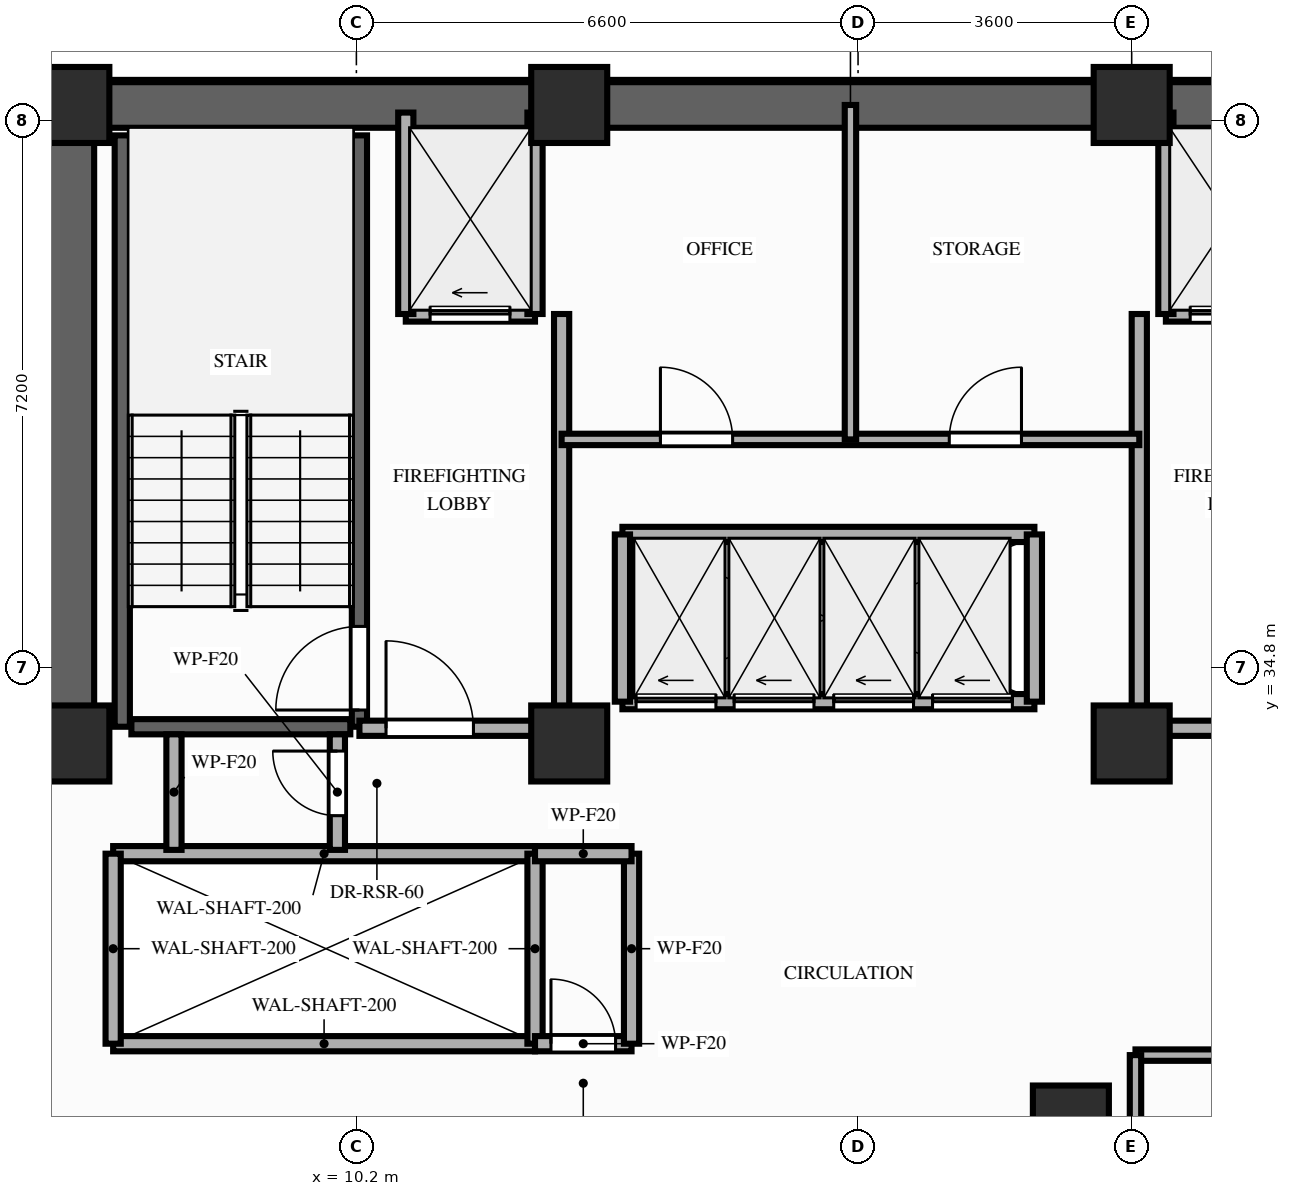
"""IFC4 building model, lengths in metres.
Left out: names, types, materials, properties, quantities, classifications, styles, units other than length and angle.
Written with IfcOpenShell. Run it as: python <this file> out.ifc"""

import sys

from ifc_helpers import new_model, si_unit, direction, frame, frame_2d, origin, origin_2d, place, context, subcontext, project, spatial, rectangle, extrude, element, fill, save


model = new_model("IFC4")
c1 = context("Model", 3, precision=1e-05, world=origin(), true_north=direction((0.0, 1.0)))
c2 = subcontext(c1, "Body", "Model", "MODEL_VIEW")
j1 = project(units=[si_unit("LENGTHUNIT", "METRE"), si_unit("PLANEANGLEUNIT", "RADIAN")], contexts=[c1])
p1 = place(None, origin())
s1 = spatial("IfcSite", under=j1, at=p1, CompositionType="ELEMENT")
p2 = place(p1, origin())
s2 = spatial("IfcBuilding", under=s1, at=p2, CompositionType="ELEMENT")
p3 = place(p2, frame((0.0, 0.0, 110.6)))
s3 = spatial("IfcBuildingStorey", under=s2, at=p3, CompositionType="ELEMENT", Elevation=110.6)
for number, where, z_axis, x_axis in (
    (1, (6.45, 33.8, 0.0), (0.0, 0.0, 1.0), (1.0, 0.0, 0.0)),
    (2, (13.0, 33.8, 0.0), (0.0, 0.0, 1.0), (1.0, 0.0, 0.0)),
    (3, (20.4, 33.8, 0.0), (0.0, 0.0, 1.0), (1.0, 0.0, 0.0)),
    (4, (6.45, 42.2, 0.0), (0.0, 0.0, 1.0), (1.0, 0.0, 0.0)),
    (5, (13.0, 42.2, 0.0), (0.0, 0.0, 1.0), (1.0, 0.0, 0.0)),
    (6, (20.4, 42.2, 0.0), (0.0, 0.0, 1.0), (1.0, 0.0, 0.0)),
    (7, (19.6, 28.8, 0.0), (0.0, 0.0, 1.0), (1.0, 0.0, 0.0)),
):
    element("IfcColumn", number, at=place(p3, frame(where, z_axis=z_axis, x_axis=x_axis)), inside=s3, PredefinedType="COLUMN", context=c2, shape_type="SweptSolid", body=[
        extrude(rectangle(XDim=1.0, YDim=1.0, at=origin_2d()), origin(), (0.0, 0.0, 1.0), 3.2),
    ])
p4 = place(p3, frame((6.45, 42.2, 0.0), z_axis=(0.0, 0.0, 1.0), x_axis=(1.0, 0.0, 0.0)))
e8 = element("IfcWall", 8, at=p4, inside=s3, PredefinedType="SHEAR", context=c2, shape_type="SweptSolid", body=[
    extrude(rectangle(XDim=20.45, YDim=0.6, at=frame_2d((10.225, 0.0))), origin(), (0.0, 0.0, 1.0), 3.02),
])
p5 = place(p3, frame((6.45, 33.8, 0.0), z_axis=(0.0, 0.0, 1.0), x_axis=(0.0, 1.0, 0.0)))
e9 = element("IfcWall", 9, at=p5, inside=s3, PredefinedType="SHEAR", context=c2, shape_type="SweptSolid", body=[
    extrude(rectangle(XDim=7.95, YDim=0.6, at=frame_2d((3.975, 0.0))), origin(), (0.0, 0.0, 1.0), 3.02),
])
p6 = place(p3, frame((7.12, 34.02, 0.0), z_axis=(0.0, 0.0, 1.0), x_axis=(0.0, 1.0, 0.0)))
e10 = element("IfcWall", 10, at=p6, inside=s3, PredefinedType="SHEAR", context=c2, shape_type="SweptSolid", body=[
    extrude(rectangle(XDim=7.78, YDim=0.2, at=frame_2d((3.89, 0.0))), origin(), (0.0, 0.0, 1.0), 3.02),
])
p7 = place(p3, frame((10.24, 34.02, 0.0), z_axis=(0.0, 0.0, 1.0), x_axis=(0.0, 1.0, 0.0)))
e11 = element("IfcWall", 11, at=p7, inside=s3, PredefinedType="SHEAR", context=c2, shape_type="SweptSolid", body=[
    extrude(rectangle(XDim=7.78, YDim=0.2, at=frame_2d((3.89, 0.0))), origin(), (0.0, 0.0, 1.0), 3.02),
])
p8 = place(p7, frame((0.22, 0.0, 0.0)))
e12 = element("IfcOpeningElement", 12, at=p8, cuts=e11, PredefinedType="OPENING", context=c2, shape_type="SweptSolid", body=[
    extrude(rectangle(XDim=1.1, YDim=2.15, at=frame_2d((0.55, 1.075))), frame((0.0, 0.11, 0.0), z_axis=(0.0, -1.0, 0.0), x_axis=(1.0, 0.0, 0.0)), (0.0, 0.0, 1.0), 0.22),
])
p9 = place(p3, frame((7.24, 34.02, 0.0), z_axis=(0.0, 0.0, 1.0), x_axis=(1.0, 0.0, 0.0)))
e13 = element("IfcWall", 13, at=p9, inside=s3, PredefinedType="SHEAR", context=c2, shape_type="SweptSolid", body=[
    extrude(rectangle(XDim=2.88, YDim=0.2, at=frame_2d((1.44, 0.0))), origin(), (0.0, 0.0, 1.0), 3.02),
])
for number, where, z_axis, x_axis in (
    (14, (7.0, 29.85, 0.0), (0.0, 0.0, 1.0), (1.0, 0.0, 0.0)),
    (15, (7.0, 32.35, 0.0), (0.0, 0.0, 1.0), (1.0, 0.0, 0.0)),
):
    element("IfcWall", number, at=place(p3, frame(where, z_axis=z_axis, x_axis=x_axis)), inside=s3, PredefinedType="MOVABLE", context=c2, shape_type="SweptSolid", body=[
        extrude(rectangle(XDim=5.55, YDim=0.2, at=frame_2d((2.775, 0.0))), origin(), (0.0, 0.0, 1.0), 3.02),
    ])
for number, where, z_axis, x_axis in (
    (16, (7.0, 29.85, 0.0), (0.0, 0.0, 1.0), (0.0, 1.0, 0.0)),
    (17, (12.55, 29.85, 0.0), (0.0, 0.0, 1.0), (0.0, 1.0, 0.0)),
):
    element("IfcWall", number, at=place(p3, frame(where, z_axis=z_axis, x_axis=x_axis)), inside=s3, PredefinedType="MOVABLE", context=c2, shape_type="SweptSolid", body=[
        extrude(rectangle(XDim=2.5, YDim=0.2, at=frame_2d((1.25, 0.0))), origin(), (0.0, 0.0, 1.0), 3.02),
    ])
p10 = place(p3, frame((10.85, 39.45, 0.0), z_axis=(0.0, 0.0, 1.0), x_axis=(1.0, 0.0, 0.0)))
e18 = element("IfcWall", 18, at=p10, inside=s3, PredefinedType="MOVABLE", context=c2, shape_type="SweptSolid", body=[
    extrude(rectangle(XDim=1.7, YDim=0.2, at=frame_2d((0.85, 0.0))), origin(), (0.0, 0.0, 1.0), 3.02),
])
p11 = place(p10, frame((0.32, 0.0, 0.0)))
e19 = element("IfcOpeningElement", 19, at=p11, cuts=e18, PredefinedType="OPENING", context=c2, shape_type="SweptSolid", body=[
    extrude(rectangle(XDim=1.05, YDim=2.15, at=frame_2d((0.525, 1.075))), frame((0.0, 0.11, 0.0), z_axis=(0.0, -1.0, 0.0), x_axis=(1.0, 0.0, 0.0)), (0.0, 0.0, 1.0), 0.22),
])
p12 = place(p3, frame((20.85, 39.45, 0.0), z_axis=(0.0, 0.0, 1.0), x_axis=(1.0, 0.0, 0.0)))
e20 = element("IfcWall", 20, at=p12, inside=s3, PredefinedType="MOVABLE", context=c2, shape_type="SweptSolid", body=[
    extrude(rectangle(XDim=1.7, YDim=0.2, at=frame_2d((0.85, 0.0))), origin(), (0.0, 0.0, 1.0), 3.02),
])
p13 = place(p12, frame((0.32, 0.0, 0.0)))
e21 = element("IfcOpeningElement", 21, at=p13, cuts=e20, PredefinedType="OPENING", context=c2, shape_type="SweptSolid", body=[
    extrude(rectangle(XDim=1.05, YDim=2.15, at=frame_2d((0.525, 1.075))), frame((0.0, 0.11, 0.0), z_axis=(0.0, -1.0, 0.0), x_axis=(1.0, 0.0, 0.0)), (0.0, 0.0, 1.0), 0.22),
])
for number, where, z_axis, x_axis in (
    (22, (10.85, 39.45, 0.0), (0.0, 0.0, 1.0), (0.0, 1.0, 0.0)),
    (23, (12.55, 39.45, 0.0), (0.0, 0.0, 1.0), (0.0, 1.0, 0.0)),
):
    element("IfcWall", number, at=place(p3, frame(where, z_axis=z_axis, x_axis=x_axis)), inside=s3, PredefinedType="MOVABLE", context=c2, shape_type="SweptSolid", body=[
        extrude(rectangle(XDim=2.65, YDim=0.2, at=frame_2d((1.325, 0.0))), origin(), (0.0, 0.0, 1.0), 2.4),
    ])
p14 = place(p3, frame((12.9, 34.0, 0.0), z_axis=(0.0, 0.0, 1.0), x_axis=(0.0, 1.0, 0.0)))
e24 = element("IfcWall", 24, at=p14, inside=s3, PredefinedType="PARTITIONING", context=c2, shape_type="SweptSolid", body=[
    extrude(rectangle(XDim=5.45, YDim=0.2, at=frame_2d((2.725, 0.0))), origin(), (0.0, 0.0, 1.0), 2.4),
])
p15 = place(p3, frame((10.24, 34.0, 0.0), z_axis=(0.0, 0.0, 1.0), x_axis=(1.0, 0.0, 0.0)))
e25 = element("IfcWall", 25, at=p15, inside=s3, PredefinedType="PARTITIONING", context=c2, shape_type="SweptSolid", body=[
    extrude(rectangle(XDim=2.66, YDim=0.2, at=frame_2d((1.33, 0.0))), origin(), (0.0, 0.0, 1.0), 2.4),
])
p16 = place(p15, frame((0.35, 0.0, 0.0)))
e26 = element("IfcOpeningElement", 26, at=p16, cuts=e25, PredefinedType="OPENING", context=c2, shape_type="SweptSolid", body=[
    extrude(rectangle(XDim=1.15, YDim=2.15, at=frame_2d((0.575, 1.075))), frame((0.0, 0.11, 0.0), z_axis=(0.0, -1.0, 0.0), x_axis=(1.0, 0.0, 0.0)), (0.0, 0.0, 1.0), 0.22),
])
p17 = place(p3, frame((20.85, 39.45, 0.0), z_axis=(0.0, 0.0, 1.0), x_axis=(0.0, 1.0, 0.0)))
e27 = element("IfcWall", 27, at=p17, inside=s3, PredefinedType="MOVABLE", context=c2, shape_type="SweptSolid", body=[
    extrude(rectangle(XDim=2.65, YDim=0.2, at=frame_2d((1.325, 0.0))), origin(), (0.0, 0.0, 1.0), 2.4),
])
p18 = place(p3, frame((20.5, 34.0, 0.0), z_axis=(0.0, 0.0, 1.0), x_axis=(0.0, 1.0, 0.0)))
e28 = element("IfcWall", 28, at=p18, inside=s3, PredefinedType="PARTITIONING", context=c2, shape_type="SweptSolid", body=[
    extrude(rectangle(XDim=5.45, YDim=0.2, at=frame_2d((2.725, 0.0))), origin(), (0.0, 0.0, 1.0), 2.4),
])
p19 = place(p3, frame((20.5, 34.0, 0.0), z_axis=(0.0, 0.0, 1.0), x_axis=(1.0, 0.0, 0.0)))
e29 = element("IfcWall", 29, at=p19, inside=s3, PredefinedType="PARTITIONING", context=c2, shape_type="SweptSolid", body=[
    extrude(rectangle(XDim=2.6, YDim=0.2, at=frame_2d((1.3, 0.0))), origin(), (0.0, 0.0, 1.0), 2.4),
])
p20 = place(p19, frame((1.05, 0.0, 0.0)))
e30 = element("IfcOpeningElement", 30, at=p20, cuts=e29, PredefinedType="OPENING", context=c2, shape_type="SweptSolid", body=[
    extrude(rectangle(XDim=1.15, YDim=2.15, at=frame_2d((0.575, 1.075))), frame((0.0, 0.11, 0.0), z_axis=(0.0, -1.0, 0.0), x_axis=(1.0, 0.0, 0.0)), (0.0, 0.0, 1.0), 0.22),
])
p21 = place(p3, frame((12.55, 29.85, 0.0), z_axis=(0.0, 0.0, 1.0), x_axis=(1.0, 0.0, 0.0)))
e31 = element("IfcWall", 31, at=p21, inside=s3, PredefinedType="PARTITIONING", context=c2, shape_type="SweptSolid", body=[
    extrude(rectangle(XDim=1.27, YDim=0.2, at=frame_2d((0.635, 0.0))), origin(), (0.0, 0.0, 1.0), 3.02),
])
p22 = place(p21, frame((0.21, 0.0, 0.0)))
e32 = element("IfcOpeningElement", 32, at=p22, cuts=e31, PredefinedType="OPENING", context=c2, shape_type="SweptSolid", body=[
    extrude(rectangle(XDim=0.85, YDim=2.05, at=frame_2d((0.425, 1.025))), frame((0.0, 0.11, 0.0), z_axis=(0.0, -1.0, 0.0), x_axis=(1.0, 0.0, 0.0)), (0.0, 0.0, 1.0), 0.22),
])
p23 = place(p3, frame((13.82, 29.85, 0.0), z_axis=(0.0, 0.0, 1.0), x_axis=(0.0, 1.0, 0.0)))
e33 = element("IfcWall", 33, at=p23, inside=s3, PredefinedType="PARTITIONING", context=c2, shape_type="SweptSolid", body=[
    extrude(rectangle(XDim=2.5, YDim=0.2, at=frame_2d((1.25, 0.0))), origin(), (0.0, 0.0, 1.0), 3.02),
])
p24 = place(p3, frame((12.55, 32.35, 0.0), z_axis=(0.0, 0.0, 1.0), x_axis=(1.0, 0.0, 0.0)))
e34 = element("IfcWall", 34, at=p24, inside=s3, PredefinedType="PARTITIONING", context=c2, shape_type="SweptSolid", body=[
    extrude(rectangle(XDim=1.27, YDim=0.2, at=frame_2d((0.635, 0.0))), origin(), (0.0, 0.0, 1.0), 3.02),
])
p25 = place(p3, frame((7.8, 32.4, 0.0), z_axis=(0.0, 0.0, 1.0), x_axis=(0.0, 1.0, 0.0)))
e35 = element("IfcWall", 35, at=p25, inside=s3, PredefinedType="PARTITIONING", context=c2, shape_type="SweptSolid", body=[
    extrude(rectangle(XDim=1.52, YDim=0.2, at=frame_2d((0.76, 0.0))), origin(), (0.0, 0.0, 1.0), 2.4),
])
p26 = place(p3, frame((9.95, 32.4, 0.0), z_axis=(0.0, 0.0, 1.0), x_axis=(0.0, 1.0, 0.0)))
e36 = element("IfcWall", 36, at=p26, inside=s3, PredefinedType="PARTITIONING", context=c2, shape_type="SweptSolid", body=[
    extrude(rectangle(XDim=1.52, YDim=0.2, at=frame_2d((0.76, 0.0))), origin(), (0.0, 0.0, 1.0), 2.4),
])
p27 = place(p26, frame((0.45, 0.0, 0.0)))
e37 = element("IfcOpeningElement", 37, at=p27, cuts=e36, PredefinedType="OPENING", context=c2, shape_type="SweptSolid", body=[
    extrude(rectangle(XDim=0.85, YDim=2.05, at=frame_2d((0.425, 1.025))), frame((0.0, 0.11, 0.0), z_axis=(0.0, -1.0, 0.0), x_axis=(1.0, 0.0, 0.0)), (0.0, 0.0, 1.0), 0.22),
])
p28 = place(p3, frame((12.9, 37.8, 0.0), z_axis=(0.0, 0.0, 1.0), x_axis=(1.0, 0.0, 0.0)))
e38 = element("IfcWall", 38, at=p28, inside=s3, PredefinedType="PARTITIONING", context=c2, shape_type="SweptSolid", body=[
    extrude(rectangle(XDim=7.6, YDim=0.15, at=frame_2d((3.8, 0.0))), origin(), (0.0, 0.0, 1.0), 3.02),
])
p29 = place(p28, frame((1.3, 0.0, 0.0)))
e39 = element("IfcOpeningElement", 39, at=p29, cuts=e38, PredefinedType="OPENING", context=c2, shape_type="SweptSolid", body=[
    extrude(rectangle(XDim=0.95, YDim=2.15, at=frame_2d((0.475, 1.075))), frame((0.0, 0.085, 0.0), z_axis=(0.0, -1.0, 0.0), x_axis=(1.0, 0.0, 0.0)), (0.0, 0.0, 1.0), 0.17),
])
p30 = place(p28, frame((5.1, 0.0, 0.0)))
e40 = element("IfcOpeningElement", 40, at=p30, cuts=e38, PredefinedType="OPENING", context=c2, shape_type="SweptSolid", body=[
    extrude(rectangle(XDim=0.95, YDim=2.15, at=frame_2d((0.475, 1.075))), frame((0.0, 0.085, 0.0), z_axis=(0.0, -1.0, 0.0), x_axis=(1.0, 0.0, 0.0)), (0.0, 0.0, 1.0), 0.17),
])
p31 = place(p3, frame((16.7, 37.8, 0.0), z_axis=(0.0, 0.0, 1.0), x_axis=(0.0, 1.0, 0.0)))
e41 = element("IfcWall", 41, at=p31, inside=s3, PredefinedType="PARTITIONING", context=c2, shape_type="SweptSolid", body=[
    extrude(rectangle(XDim=4.4, YDim=0.15, at=frame_2d((2.2, 0.0))), origin(), (0.0, 0.0, 1.0), 2.4),
])
p32 = place(p3, frame((13.7, 34.35, 0.0), z_axis=(0.0, 0.0, 1.0), x_axis=(1.0, 0.0, 0.0)))
e42 = element("IfcWall", 42, at=p32, inside=s3, PredefinedType="MOVABLE", context=c2, shape_type="SweptSolid", body=[
    extrude(rectangle(XDim=5.42, YDim=0.2, at=frame_2d((2.71, 0.0))), origin(), (0.0, 0.0, 1.0), 3.02),
])
p33 = place(p32, frame((0.18, 0.0, 0.0)))
e43 = element("IfcOpeningElement", 43, at=p33, cuts=e42, PredefinedType="OPENING", context=c2, shape_type="SweptSolid", body=[
    extrude(rectangle(XDim=1.05, YDim=2.15, at=frame_2d((0.525, 1.075))), frame((0.0, 0.11, 0.0), z_axis=(0.0, -1.0, 0.0), x_axis=(1.0, 0.0, 0.0)), (0.0, 0.0, 1.0), 0.22),
])
p34 = place(p32, frame((1.47, 0.0, 0.0)))
e44 = element("IfcOpeningElement", 44, at=p34, cuts=e42, PredefinedType="OPENING", context=c2, shape_type="SweptSolid", body=[
    extrude(rectangle(XDim=1.05, YDim=2.15, at=frame_2d((0.525, 1.075))), frame((0.0, 0.11, 0.0), z_axis=(0.0, -1.0, 0.0), x_axis=(1.0, 0.0, 0.0)), (0.0, 0.0, 1.0), 0.22),
])
p35 = place(p32, frame((2.78, 0.0, 0.0)))
e45 = element("IfcOpeningElement", 45, at=p35, cuts=e42, PredefinedType="OPENING", context=c2, shape_type="SweptSolid", body=[
    extrude(rectangle(XDim=1.05, YDim=2.15, at=frame_2d((0.525, 1.075))), frame((0.0, 0.11, 0.0), z_axis=(0.0, -1.0, 0.0), x_axis=(1.0, 0.0, 0.0)), (0.0, 0.0, 1.0), 0.22),
])
p36 = place(p32, frame((4.08, 0.0, 0.0)))
e46 = element("IfcOpeningElement", 46, at=p36, cuts=e42, PredefinedType="OPENING", context=c2, shape_type="SweptSolid", body=[
    extrude(rectangle(XDim=1.05, YDim=2.15, at=frame_2d((0.525, 1.075))), frame((0.0, 0.11, 0.0), z_axis=(0.0, -1.0, 0.0), x_axis=(1.0, 0.0, 0.0)), (0.0, 0.0, 1.0), 0.22),
])
p37 = place(p3, frame((13.7, 36.55, 0.0), z_axis=(0.0, 0.0, 1.0), x_axis=(1.0, 0.0, 0.0)))
e47 = element("IfcWall", 47, at=p37, inside=s3, PredefinedType="MOVABLE", context=c2, shape_type="SweptSolid", body=[
    extrude(rectangle(XDim=5.42, YDim=0.2, at=frame_2d((2.71, 0.0))), origin(), (0.0, 0.0, 1.0), 3.02),
])
for number, where, z_axis, x_axis in (
    (48, (13.7, 34.35, 0.0), (0.0, 0.0, 1.0), (0.0, 1.0, 0.0)),
    (49, (19.12, 34.35, 0.0), (0.0, 0.0, 1.0), (0.0, 1.0, 0.0)),
):
    element("IfcWall", number, at=place(p3, frame(where, z_axis=z_axis, x_axis=x_axis)), inside=s3, PredefinedType="MOVABLE", context=c2, shape_type="SweptSolid", body=[
        extrude(rectangle(XDim=2.2, YDim=0.2, at=frame_2d((1.1, 0.0))), origin(), (0.0, 0.0, 1.0), 3.02),
    ])
p38 = place(p3, frame((20.45, 29.7, 0.0), z_axis=(0.0, 0.0, 1.0), x_axis=(1.0, 0.0, 0.0)))
e50 = element("IfcWall", 50, at=p38, inside=s3, PredefinedType="PARTITIONING", context=c2, shape_type="SweptSolid", body=[
    extrude(rectangle(XDim=6.7, YDim=0.15, at=frame_2d((3.35, 0.0))), origin(), (0.0, 0.0, 1.0), 3.02),
])
p39 = place(p38, frame((2.8, 0.0, 0.0)))
e51 = element("IfcOpeningElement", 51, at=p39, cuts=e50, PredefinedType="OPENING", context=c2, shape_type="SweptSolid", body=[
    extrude(rectangle(XDim=0.95, YDim=2.15, at=frame_2d((0.475, 1.075))), frame((0.0, 0.085, 0.0), z_axis=(0.0, -1.0, 0.0), x_axis=(1.0, 0.0, 0.0)), (0.0, 0.0, 1.0), 0.17),
])
p40 = place(p3, frame((20.45, 26.75, 0.0), z_axis=(0.0, 0.0, 1.0), x_axis=(0.0, 1.0, 0.0)))
e52 = element("IfcWall", 52, at=p40, inside=s3, PredefinedType="PARTITIONING", context=c2, shape_type="SweptSolid", body=[
    extrude(rectangle(XDim=2.95, YDim=0.15, at=frame_2d((1.475, 0.0))), origin(), (0.0, 0.0, 1.0), 2.4),
])
p41 = place(p8, origin())
e53 = element("IfcDoor", 53, at=p41, inside=s3, OperationType="SINGLE_SWING_LEFT", PredefinedType="DOOR", context=c2, shape_type="SweptSolid", body=[
    extrude(rectangle(XDim=1.1, YDim=2.15, at=frame_2d((0.55, 1.075))), frame((0.0, 0.025, 0.0), z_axis=(0.0, -1.0, 0.0), x_axis=(1.0, 0.0, 0.0)), (0.0, 0.0, 1.0), 0.05),
])
fill(e12, e53)
p42 = place(p11, origin())
e54 = element("IfcDoor", 54, at=p42, inside=s3, OperationType="SLIDING_TO_LEFT", PredefinedType="DOOR", context=c2, shape_type="SweptSolid", body=[
    extrude(rectangle(XDim=1.05, YDim=2.15, at=frame_2d((0.525, 1.075))), frame((0.0, 0.025, 0.0), z_axis=(0.0, -1.0, 0.0), x_axis=(1.0, 0.0, 0.0)), (0.0, 0.0, 1.0), 0.05),
])
fill(e19, e54)
p43 = place(p13, origin())
e55 = element("IfcDoor", 55, at=p43, inside=s3, OperationType="SLIDING_TO_LEFT", PredefinedType="DOOR", context=c2, shape_type="SweptSolid", body=[
    extrude(rectangle(XDim=1.05, YDim=2.15, at=frame_2d((0.525, 1.075))), frame((0.0, 0.025, 0.0), z_axis=(0.0, -1.0, 0.0), x_axis=(1.0, 0.0, 0.0)), (0.0, 0.0, 1.0), 0.05),
])
fill(e21, e55)
p44 = place(p16, origin())
e56 = element("IfcDoor", 56, at=p44, inside=s3, OperationType="SINGLE_SWING_LEFT", PredefinedType="DOOR", context=c2, shape_type="SweptSolid", body=[
    extrude(rectangle(XDim=1.15, YDim=2.15, at=frame_2d((0.575, 1.075))), frame((0.0, 0.025, 0.0), z_axis=(0.0, -1.0, 0.0), x_axis=(1.0, 0.0, 0.0)), (0.0, 0.0, 1.0), 0.05),
])
fill(e26, e56)
p45 = place(p22, origin())
e57 = element("IfcDoor", 57, at=p45, inside=s3, OperationType="SINGLE_SWING_LEFT", PredefinedType="DOOR", context=c2, shape_type="SweptSolid", body=[
    extrude(rectangle(XDim=0.85, YDim=2.05, at=frame_2d((0.425, 1.025))), frame((0.0, 0.025, 0.0), z_axis=(0.0, -1.0, 0.0), x_axis=(1.0, 0.0, 0.0)), (0.0, 0.0, 1.0), 0.05),
])
fill(e32, e57)
p46 = place(p27, origin())
e58 = element("IfcDoor", 58, at=p46, inside=s3, OperationType="SINGLE_SWING_RIGHT", PredefinedType="DOOR", context=c2, shape_type="SweptSolid", body=[
    extrude(rectangle(XDim=0.85, YDim=2.05, at=frame_2d((0.425, 1.025))), frame((0.0, 0.025, 0.0), z_axis=(0.0, -1.0, 0.0), x_axis=(1.0, 0.0, 0.0)), (0.0, 0.0, 1.0), 0.05),
])
fill(e37, e58)
p47 = place(p29, origin())
e59 = element("IfcDoor", 59, at=p47, inside=s3, OperationType="SINGLE_SWING_LEFT", PredefinedType="DOOR", context=c2, shape_type="SweptSolid", body=[
    extrude(rectangle(XDim=0.95, YDim=2.15, at=frame_2d((0.475, 1.075))), frame((0.0, 0.025, 0.0), z_axis=(0.0, -1.0, 0.0), x_axis=(1.0, 0.0, 0.0)), (0.0, 0.0, 1.0), 0.05),
])
fill(e39, e59)
p48 = place(p30, origin())
e60 = element("IfcDoor", 60, at=p48, inside=s3, OperationType="SINGLE_SWING_RIGHT", PredefinedType="DOOR", context=c2, shape_type="SweptSolid", body=[
    extrude(rectangle(XDim=0.95, YDim=2.15, at=frame_2d((0.475, 1.075))), frame((0.0, 0.025, 0.0), z_axis=(0.0, -1.0, 0.0), x_axis=(1.0, 0.0, 0.0)), (0.0, 0.0, 1.0), 0.05),
])
fill(e40, e60)
p49 = place(p33, origin())
e61 = element("IfcDoor", 61, at=p49, inside=s3, OperationType="SLIDING_TO_LEFT", PredefinedType="DOOR", context=c2, shape_type="SweptSolid", body=[
    extrude(rectangle(XDim=1.05, YDim=2.15, at=frame_2d((0.525, 1.075))), frame((0.0, 0.025, 0.0), z_axis=(0.0, -1.0, 0.0), x_axis=(1.0, 0.0, 0.0)), (0.0, 0.0, 1.0), 0.05),
])
fill(e43, e61)
p50 = place(p34, origin())
e62 = element("IfcDoor", 62, at=p50, inside=s3, OperationType="SLIDING_TO_LEFT", PredefinedType="DOOR", context=c2, shape_type="SweptSolid", body=[
    extrude(rectangle(XDim=1.05, YDim=2.15, at=frame_2d((0.525, 1.075))), frame((0.0, 0.025, 0.0), z_axis=(0.0, -1.0, 0.0), x_axis=(1.0, 0.0, 0.0)), (0.0, 0.0, 1.0), 0.05),
])
fill(e44, e62)
p51 = place(p35, origin())
e63 = element("IfcDoor", 63, at=p51, inside=s3, OperationType="SLIDING_TO_LEFT", PredefinedType="DOOR", context=c2, shape_type="SweptSolid", body=[
    extrude(rectangle(XDim=1.05, YDim=2.15, at=frame_2d((0.525, 1.075))), frame((0.0, 0.025, 0.0), z_axis=(0.0, -1.0, 0.0), x_axis=(1.0, 0.0, 0.0)), (0.0, 0.0, 1.0), 0.05),
])
fill(e45, e63)
p52 = place(p36, origin())
e64 = element("IfcDoor", 64, at=p52, inside=s3, OperationType="SLIDING_TO_LEFT", PredefinedType="DOOR", context=c2, shape_type="SweptSolid", body=[
    extrude(rectangle(XDim=1.05, YDim=2.15, at=frame_2d((0.525, 1.075))), frame((0.0, 0.025, 0.0), z_axis=(0.0, -1.0, 0.0), x_axis=(1.0, 0.0, 0.0)), (0.0, 0.0, 1.0), 0.05),
])
fill(e46, e64)
save(model, sys.argv[1])
